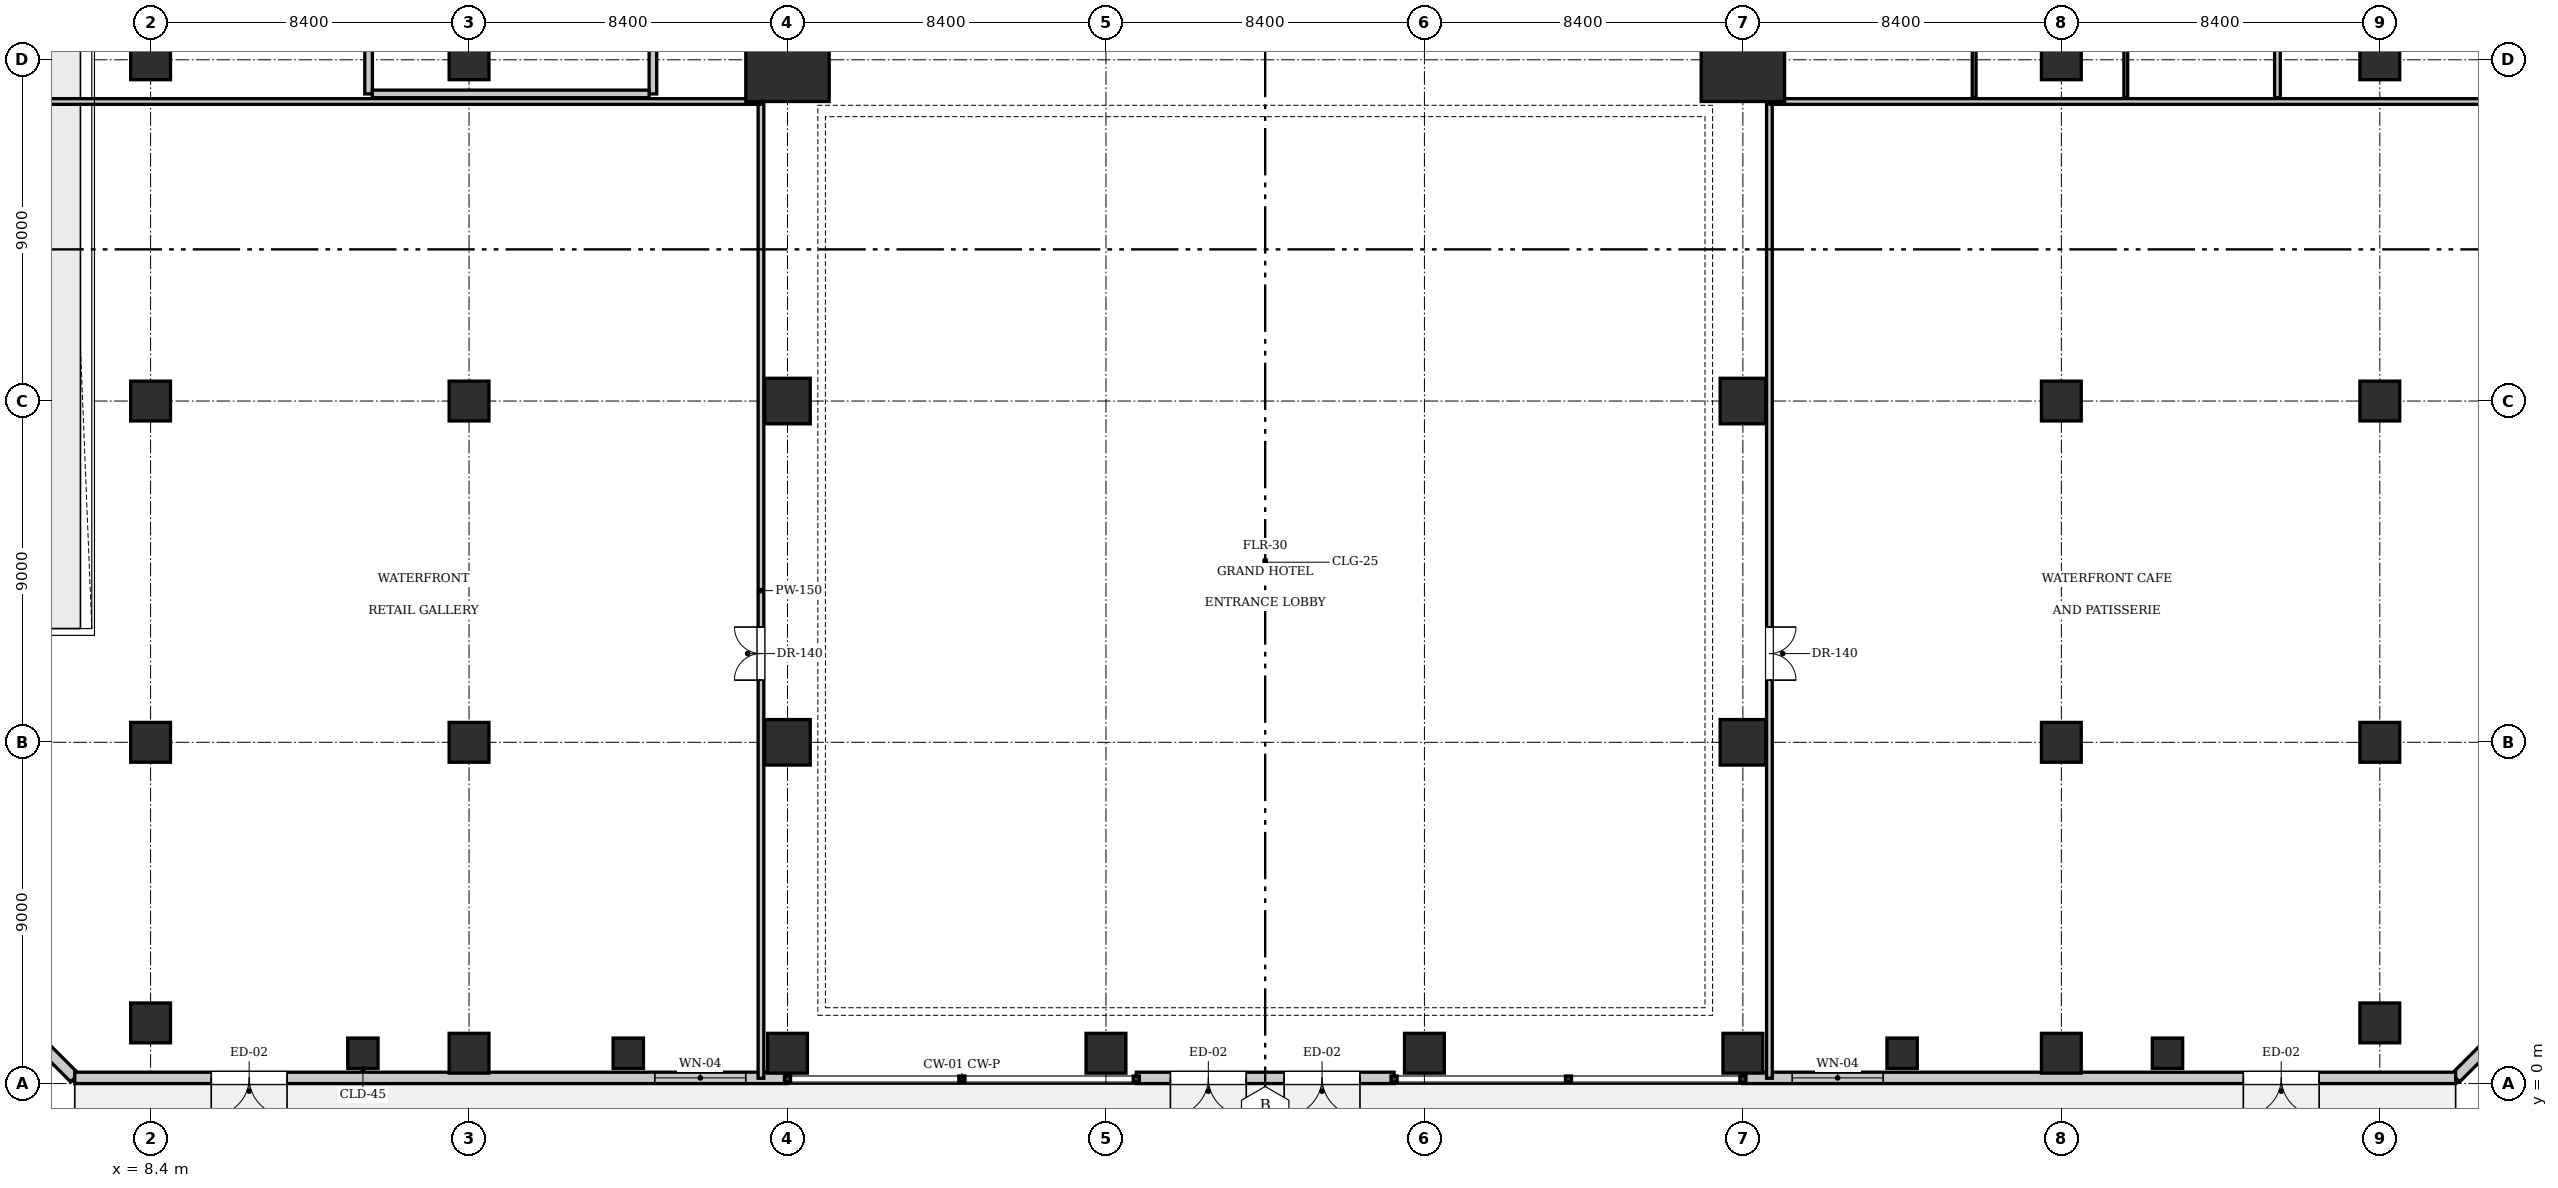
"""IFC4 building model, lengths in metres.
Left out: names, types, materials, properties, quantities, classifications, styles, units other than length and angle.
Written with IfcOpenShell. Run it as: python <this file> out.ifc"""

import sys

from ifc_helpers import new_model, si_unit, direction, frame, frame_2d, origin, origin_2d, place, context, subcontext, project, spatial, rectangle, extrude, element, fill, save


model = new_model("IFC4")
c1 = context("Model", 3, precision=1e-05, world=origin(), true_north=direction((0.0, 1.0)))
c2 = subcontext(c1, "Body", "Model", "MODEL_VIEW")
j1 = project(units=[si_unit("LENGTHUNIT", "METRE"), si_unit("PLANEANGLEUNIT", "RADIAN")], contexts=[c1])
p1 = place(None, origin())
s1 = spatial("IfcSite", under=j1, at=p1, CompositionType="ELEMENT")
p2 = place(p1, origin())
s2 = spatial("IfcBuilding", under=s1, at=p2, CompositionType="ELEMENT")
p3 = place(p2, origin())
s3 = spatial("IfcBuildingStorey", under=s2, at=p3, CompositionType="ELEMENT", Elevation=0.0)
for number, where, z_axis, x_axis in (
    (1, (25.2, 27.0, 0.0), (0.0, 0.0, 1.0), (1.0, 0.0, 0.0)),
    (2, (50.4, 27.0, 0.0), (0.0, 0.0, 1.0), (1.0, 0.0, 0.0)),
):
    element("IfcColumn", number, at=place(p3, frame(where, z_axis=z_axis, x_axis=x_axis)), inside=s3, PredefinedType="COLUMN", context=c2, shape_type="SweptSolid", body=[
        extrude(rectangle(XDim=2.2, YDim=2.2, at=origin_2d()), origin(), (0.0, 0.0, 1.0), 5.6),
    ])
for number, where, z_axis, x_axis in (
    (3, (25.2, 18.0, 0.0), (0.0, 0.0, 1.0), (1.0, 0.0, 0.0)),
    (4, (50.4, 18.0, 0.0), (0.0, 0.0, 1.0), (1.0, 0.0, 0.0)),
    (5, (25.2, 9.0, 0.0), (0.0, 0.0, 1.0), (1.0, 0.0, 0.0)),
    (6, (50.4, 9.0, 0.0), (0.0, 0.0, 1.0), (1.0, 0.0, 0.0)),
):
    element("IfcColumn", number, at=place(p3, frame(where, z_axis=z_axis, x_axis=x_axis)), inside=s3, PredefinedType="COLUMN", context=c2, shape_type="SweptSolid", body=[
        extrude(rectangle(XDim=1.2, YDim=1.2, at=origin_2d()), origin(), (0.0, 0.0, 1.0), 5.6),
    ])
for number, where, z_axis, x_axis in (
    (7, (16.8, 9.0, 0.0), (0.0, 0.0, 1.0), (1.0, 0.0, 0.0)),
    (8, (58.8, 9.0, 0.0), (0.0, 0.0, 1.0), (1.0, 0.0, 0.0)),
    (9, (16.8, 18.0, 0.0), (0.0, 0.0, 1.0), (1.0, 0.0, 0.0)),
    (10, (58.8, 18.0, 0.0), (0.0, 0.0, 1.0), (1.0, 0.0, 0.0)),
    (11, (16.8, 27.0, 0.0), (0.0, 0.0, 1.0), (1.0, 0.0, 0.0)),
    (12, (58.8, 27.0, 0.0), (0.0, 0.0, 1.0), (1.0, 0.0, 0.0)),
    (13, (8.4, 1.6, 0.0), (0.0, 0.0, 1.0), (1.0, 0.0, 0.0)),
    (14, (67.2, 1.6, 0.0), (0.0, 0.0, 1.0), (1.0, 0.0, 0.0)),
    (15, (8.4, 9.0, 0.0), (0.0, 0.0, 1.0), (1.0, 0.0, 0.0)),
    (16, (67.2, 9.0, 0.0), (0.0, 0.0, 1.0), (1.0, 0.0, 0.0)),
    (17, (8.4, 18.0, 0.0), (0.0, 0.0, 1.0), (1.0, 0.0, 0.0)),
    (18, (67.2, 18.0, 0.0), (0.0, 0.0, 1.0), (1.0, 0.0, 0.0)),
    (19, (8.4, 27.0, 0.0), (0.0, 0.0, 1.0), (1.0, 0.0, 0.0)),
    (20, (67.2, 27.0, 0.0), (0.0, 0.0, 1.0), (1.0, 0.0, 0.0)),
    (21, (16.8, 0.8, 0.0), (0.0, 0.0, 1.0), (1.0, 0.0, 0.0)),
    (22, (25.2, 0.8, 0.0), (0.0, 0.0, 1.0), (1.0, 0.0, 0.0)),
    (23, (33.6, 0.8, 0.0), (0.0, 0.0, 1.0), (1.0, 0.0, 0.0)),
    (24, (42.0, 0.8, 0.0), (0.0, 0.0, 1.0), (1.0, 0.0, 0.0)),
    (25, (50.4, 0.8, 0.0), (0.0, 0.0, 1.0), (1.0, 0.0, 0.0)),
    (26, (58.8, 0.8, 0.0), (0.0, 0.0, 1.0), (1.0, 0.0, 0.0)),
):
    element("IfcColumn", number, at=place(p3, frame(where, z_axis=z_axis, x_axis=x_axis)), inside=s3, PredefinedType="COLUMN", context=c2, shape_type="SweptSolid", body=[
        extrude(rectangle(XDim=1.05, YDim=1.05, at=origin_2d()), origin(), (0.0, 0.0, 1.0), 5.6),
    ])
for number, where, z_axis, x_axis in (
    (27, (14.0, 0.8, 0.0), (0.0, 0.0, 1.0), (1.0, 0.0, 0.0)),
    (28, (21.0, 0.8, 0.0), (0.0, 0.0, 1.0), (1.0, 0.0, 0.0)),
    (29, (54.6, 0.8, 0.0), (0.0, 0.0, 1.0), (1.0, 0.0, 0.0)),
    (30, (61.6, 0.8, 0.0), (0.0, 0.0, 1.0), (1.0, 0.0, 0.0)),
):
    element("IfcColumn", number, at=place(p3, frame(where, z_axis=z_axis, x_axis=x_axis)), inside=s3, PredefinedType="PILASTER", context=c2, shape_type="SweptSolid", body=[
        extrude(rectangle(XDim=0.8, YDim=0.8, at=origin_2d()), origin(), (0.0, 0.0, 1.0), 5.6),
    ])
p4 = place(p3, frame((0.15, 6.4, 0.0), z_axis=(0.0, 0.0, 1.0), x_axis=(0.707106781187, -0.707106781187, 0.0)))
e31 = element("IfcWall", 31, at=p4, inside=s3, PredefinedType="SOLIDWALL", context=c2, shape_type="SweptSolid", body=[
    extrude(rectangle(XDim=8.839, YDim=0.3, at=frame_2d((4.419, 0.0))), origin(), (0.0, 0.0, 1.0), 5.32),
])
p5 = place(p4, frame((3.2, 0.0, 0.9)))
e32 = element("IfcOpeningElement", 32, at=p5, cuts=e31, PredefinedType="OPENING", context=c2, shape_type="SweptSolid", body=[
    extrude(rectangle(XDim=2.4, YDim=2.6, at=frame_2d((1.2, 1.3))), frame((0.0, 0.16, 0.0), z_axis=(0.0, -1.0, 0.0), x_axis=(1.0, 0.0, 0.0)), (0.0, 0.0, 1.0), 0.32),
])
p6 = place(p3, frame((69.2, 0.15, 0.0), z_axis=(0.0, 0.0, 1.0), x_axis=(0.707106781187, 0.707106781187, 0.0)))
e33 = element("IfcWall", 33, at=p6, inside=s3, PredefinedType="SOLIDWALL", context=c2, shape_type="SweptSolid", body=[
    extrude(rectangle(XDim=8.839, YDim=0.3, at=frame_2d((4.419, 0.0))), origin(), (0.0, 0.0, 1.0), 5.32),
])
p7 = place(p6, frame((3.2, 0.0, 0.9)))
e34 = element("IfcOpeningElement", 34, at=p7, cuts=e33, PredefinedType="OPENING", context=c2, shape_type="SweptSolid", body=[
    extrude(rectangle(XDim=2.4, YDim=2.6, at=frame_2d((1.2, 1.3))), frame((0.0, 0.16, 0.0), z_axis=(0.0, -1.0, 0.0), x_axis=(1.0, 0.0, 0.0)), (0.0, 0.0, 1.0), 0.32),
])
p8 = place(p3, frame((25.2, 0.15, 0.0), z_axis=(0.0, 0.0, 1.0), x_axis=(-1.0, 0.0, 0.0)))
e35 = element("IfcWall", 35, at=p8, inside=s3, PredefinedType="SOLIDWALL", context=c2, shape_type="SweptSolid", body=[
    extrude(rectangle(XDim=18.8, YDim=0.3, at=frame_2d((9.4, 0.0))), origin(), (0.0, 0.0, 1.0), 5.32),
])
p9 = place(p8, frame((13.2, 0.0, 0.0)))
e36 = element("IfcOpeningElement", 36, at=p9, cuts=e35, PredefinedType="OPENING", context=c2, shape_type="SweptSolid", body=[
    extrude(rectangle(XDim=2.0, YDim=2.4, at=frame_2d((1.0, 1.2))), frame((0.0, 0.16, 0.0), z_axis=(0.0, -1.0, 0.0), x_axis=(1.0, 0.0, 0.0)), (0.0, 0.0, 1.0), 0.32),
])
p10 = place(p8, frame((1.1, 0.0, 0.9)))
e37 = element("IfcOpeningElement", 37, at=p10, cuts=e35, PredefinedType="OPENING", context=c2, shape_type="SweptSolid", body=[
    extrude(rectangle(XDim=2.4, YDim=2.6, at=frame_2d((1.2, 1.3))), frame((0.0, 0.16, 0.0), z_axis=(0.0, -1.0, 0.0), x_axis=(1.0, 0.0, 0.0)), (0.0, 0.0, 1.0), 0.32),
])
p11 = place(p3, frame((69.2, 0.15, 0.0), z_axis=(0.0, 0.0, 1.0), x_axis=(-1.0, 0.0, 0.0)))
e38 = element("IfcWall", 38, at=p11, inside=s3, PredefinedType="SOLIDWALL", context=c2, shape_type="SweptSolid", body=[
    extrude(rectangle(XDim=18.8, YDim=0.3, at=frame_2d((9.4, 0.0))), origin(), (0.0, 0.0, 1.0), 5.32),
])
p12 = place(p11, frame((3.6, 0.0, 0.0)))
e39 = element("IfcOpeningElement", 39, at=p12, cuts=e38, PredefinedType="OPENING", context=c2, shape_type="SweptSolid", body=[
    extrude(rectangle(XDim=2.0, YDim=2.4, at=frame_2d((1.0, 1.2))), frame((0.0, 0.16, 0.0), z_axis=(0.0, -1.0, 0.0), x_axis=(1.0, 0.0, 0.0)), (0.0, 0.0, 1.0), 0.32),
])
p13 = place(p11, frame((15.1, 0.0, 0.9)))
e40 = element("IfcOpeningElement", 40, at=p13, cuts=e38, PredefinedType="OPENING", context=c2, shape_type="SweptSolid", body=[
    extrude(rectangle(XDim=2.4, YDim=2.6, at=frame_2d((1.2, 1.3))), frame((0.0, 0.16, 0.0), z_axis=(0.0, -1.0, 0.0), x_axis=(1.0, 0.0, 0.0)), (0.0, 0.0, 1.0), 0.32),
])
p14 = place(p3, frame((41.2, 0.15, 0.0), z_axis=(0.0, 0.0, 1.0), x_axis=(-1.0, 0.0, 0.0)))
e41 = element("IfcWall", 41, at=p14, inside=s3, PredefinedType="SOLIDWALL", context=c2, shape_type="SweptSolid", body=[
    extrude(rectangle(XDim=6.8, YDim=0.3, at=frame_2d((3.4, 0.0))), origin(), (0.0, 0.0, 1.0), 5.32),
])
p15 = place(p14, frame((0.9, 0.0, 0.0)))
e42 = element("IfcOpeningElement", 42, at=p15, cuts=e41, PredefinedType="OPENING", context=c2, shape_type="SweptSolid", body=[
    extrude(rectangle(XDim=2.0, YDim=2.4, at=frame_2d((1.0, 1.2))), frame((0.0, 0.16, 0.0), z_axis=(0.0, -1.0, 0.0), x_axis=(1.0, 0.0, 0.0)), (0.0, 0.0, 1.0), 0.32),
])
p16 = place(p14, frame((3.9, 0.0, 0.0)))
e43 = element("IfcOpeningElement", 43, at=p16, cuts=e41, PredefinedType="OPENING", context=c2, shape_type="SweptSolid", body=[
    extrude(rectangle(XDim=2.0, YDim=2.4, at=frame_2d((1.0, 1.2))), frame((0.0, 0.16, 0.0), z_axis=(0.0, -1.0, 0.0), x_axis=(1.0, 0.0, 0.0)), (0.0, 0.0, 1.0), 0.32),
])
for number, where, z_axis, x_axis in (
    (44, (14.15, 26.1, 0.0), (0.0, 0.0, 1.0), (0.0, 1.0, 0.0)),
    (45, (21.65, 26.1, 0.0), (0.0, 0.0, 1.0), (0.0, 1.0, 0.0)),
):
    element("IfcWall", number, at=place(p3, frame(where, z_axis=z_axis, x_axis=x_axis)), inside=s3, PredefinedType="PARTITIONING", context=c2, shape_type="SweptSolid", body=[
        extrude(rectangle(XDim=6.1, YDim=0.2, at=frame_2d((3.05, 0.0))), origin(), (0.0, 0.0, 1.0), 5.32),
    ])
p17 = place(p3, frame((14.25, 26.1, 0.0), z_axis=(0.0, 0.0, 1.0), x_axis=(1.0, 0.0, 0.0)))
e46 = element("IfcWall", 46, at=p17, inside=s3, PredefinedType="PARTITIONING", context=c2, shape_type="SweptSolid", body=[
    extrude(rectangle(XDim=7.3, YDim=0.2, at=frame_2d((3.65, 0.0))), origin(), (0.0, 0.0, 1.0), 5.32),
])
p18 = place(p3, frame((24.5, 0.14, 0.0), z_axis=(0.0, 0.0, 1.0), x_axis=(0.0, 1.0, 0.0)))
e47 = element("IfcWall", 47, at=p18, inside=s3, PredefinedType="PARTITIONING", context=c2, shape_type="SweptSolid", body=[
    extrude(rectangle(XDim=25.72, YDim=0.15, at=frame_2d((12.86, 0.0))), origin(), (0.0, 0.0, 1.0), 5.32),
])
p19 = place(p18, frame((10.5, 0.0, 0.0)))
e48 = element("IfcOpeningElement", 48, at=p19, cuts=e47, PredefinedType="OPENING", context=c2, shape_type="SweptSolid", body=[
    extrude(rectangle(XDim=1.4, YDim=2.2, at=frame_2d((0.7, 1.1))), frame((0.0, 0.085, 0.0), z_axis=(0.0, -1.0, 0.0), x_axis=(1.0, 0.0, 0.0)), (0.0, 0.0, 1.0), 0.17),
])
p20 = place(p3, frame((0.14, 25.9, 0.0), z_axis=(0.0, 0.0, 1.0), x_axis=(1.0, 0.0, 0.0)))
e49 = element("IfcWall", 49, at=p20, inside=s3, PredefinedType="PARTITIONING", context=c2, shape_type="SweptSolid", body=[
    extrude(rectangle(XDim=24.34, YDim=0.15, at=frame_2d((12.17, 0.0))), origin(), (0.0, 0.0, 1.0), 5.32),
])
p21 = place(p3, frame((51.1, 0.14, 0.0), z_axis=(0.0, 0.0, 1.0), x_axis=(0.0, 1.0, 0.0)))
e50 = element("IfcWall", 50, at=p21, inside=s3, PredefinedType="PARTITIONING", context=c2, shape_type="SweptSolid", body=[
    extrude(rectangle(XDim=25.72, YDim=0.15, at=frame_2d((12.86, 0.0))), origin(), (0.0, 0.0, 1.0), 5.32),
])
p22 = place(p21, frame((10.5, 0.0, 0.0)))
e51 = element("IfcOpeningElement", 51, at=p22, cuts=e50, PredefinedType="OPENING", context=c2, shape_type="SweptSolid", body=[
    extrude(rectangle(XDim=1.4, YDim=2.2, at=frame_2d((0.7, 1.1))), frame((0.0, 0.085, 0.0), z_axis=(0.0, -1.0, 0.0), x_axis=(1.0, 0.0, 0.0)), (0.0, 0.0, 1.0), 0.17),
])
p23 = place(p3, frame((51.12, 25.9, 0.0), z_axis=(0.0, 0.0, 1.0), x_axis=(1.0, 0.0, 0.0)))
e52 = element("IfcWall", 52, at=p23, inside=s3, PredefinedType="PARTITIONING", context=c2, shape_type="SweptSolid", body=[
    extrude(rectangle(XDim=24.34, YDim=0.15, at=frame_2d((12.17, 0.0))), origin(), (0.0, 0.0, 1.0), 5.32),
])
for number, where, z_axis, x_axis in (
    (53, (56.5, 26.0, 0.0), (0.0, 0.0, 1.0), (0.0, 1.0, 0.0)),
    (54, (60.5, 26.0, 0.0), (0.0, 0.0, 1.0), (0.0, 1.0, 0.0)),
):
    element("IfcWall", number, at=place(p3, frame(where, z_axis=z_axis, x_axis=x_axis)), inside=s3, PredefinedType="PARTITIONING", context=c2, shape_type="SweptSolid", body=[
        extrude(rectangle(XDim=6.22, YDim=0.1, at=frame_2d((3.11, 0.0))), origin(), (0.0, 0.0, 1.0), 5.32),
    ])
p24 = place(p3, frame((64.5, 26.0, 0.0), z_axis=(0.0, 0.0, 1.0), x_axis=(0.0, 1.0, 0.0)))
e55 = element("IfcWall", 55, at=p24, inside=s3, PredefinedType="PARTITIONING", context=c2, shape_type="SweptSolid", body=[
    extrude(rectangle(XDim=6.28, YDim=0.15, at=frame_2d((3.14, 0.0))), origin(), (0.0, 0.0, 1.0), 5.32),
])
p25 = place(p9, origin())
e56 = element("IfcDoor", 56, at=p25, inside=s3, OperationType="DOUBLE_DOOR_SINGLE_SWING", PredefinedType="DOOR", context=c2, shape_type="SweptSolid", body=[
    extrude(rectangle(XDim=2.0, YDim=2.4, at=frame_2d((1.0, 1.2))), frame((0.0, 0.025, 0.0), z_axis=(0.0, -1.0, 0.0), x_axis=(1.0, 0.0, 0.0)), (0.0, 0.0, 1.0), 0.05),
])
fill(e36, e56)
p26 = place(p10, origin())
e57 = element("IfcWindow", 57, at=p26, inside=s3, PartitioningType="SINGLE_PANEL", PredefinedType="WINDOW", context=c2, shape_type="SweptSolid", body=[
    extrude(rectangle(XDim=2.4, YDim=2.6, at=frame_2d((1.2, 1.3))), frame((0.0, 0.03, 0.0), z_axis=(0.0, -1.0, 0.0), x_axis=(1.0, 0.0, 0.0)), (0.0, 0.0, 1.0), 0.06),
])
fill(e37, e57)
p27 = place(p12, origin())
e58 = element("IfcDoor", 58, at=p27, inside=s3, OperationType="DOUBLE_DOOR_SINGLE_SWING", PredefinedType="DOOR", context=c2, shape_type="SweptSolid", body=[
    extrude(rectangle(XDim=2.0, YDim=2.4, at=frame_2d((1.0, 1.2))), frame((0.0, 0.025, 0.0), z_axis=(0.0, -1.0, 0.0), x_axis=(1.0, 0.0, 0.0)), (0.0, 0.0, 1.0), 0.05),
])
fill(e39, e58)
p28 = place(p13, origin())
e59 = element("IfcWindow", 59, at=p28, inside=s3, PartitioningType="SINGLE_PANEL", PredefinedType="WINDOW", context=c2, shape_type="SweptSolid", body=[
    extrude(rectangle(XDim=2.4, YDim=2.6, at=frame_2d((1.2, 1.3))), frame((0.0, 0.03, 0.0), z_axis=(0.0, -1.0, 0.0), x_axis=(1.0, 0.0, 0.0)), (0.0, 0.0, 1.0), 0.06),
])
fill(e40, e59)
p29 = place(p15, origin())
e60 = element("IfcDoor", 60, at=p29, inside=s3, OperationType="DOUBLE_DOOR_SINGLE_SWING", PredefinedType="DOOR", context=c2, shape_type="SweptSolid", body=[
    extrude(rectangle(XDim=2.0, YDim=2.4, at=frame_2d((1.0, 1.2))), frame((0.0, 0.025, 0.0), z_axis=(0.0, -1.0, 0.0), x_axis=(1.0, 0.0, 0.0)), (0.0, 0.0, 1.0), 0.05),
])
fill(e42, e60)
p30 = place(p16, origin())
e61 = element("IfcDoor", 61, at=p30, inside=s3, OperationType="DOUBLE_DOOR_SINGLE_SWING", PredefinedType="DOOR", context=c2, shape_type="SweptSolid", body=[
    extrude(rectangle(XDim=2.0, YDim=2.4, at=frame_2d((1.0, 1.2))), frame((0.0, 0.025, 0.0), z_axis=(0.0, -1.0, 0.0), x_axis=(1.0, 0.0, 0.0)), (0.0, 0.0, 1.0), 0.05),
])
fill(e43, e61)
p31 = place(p19, origin())
e62 = element("IfcDoor", 62, at=p31, inside=s3, OperationType="DOUBLE_DOOR_SINGLE_SWING", PredefinedType="DOOR", context=c2, shape_type="SweptSolid", body=[
    extrude(rectangle(XDim=1.4, YDim=2.2, at=frame_2d((0.7, 1.1))), frame((0.0, 0.025, 0.0), z_axis=(0.0, -1.0, 0.0), x_axis=(1.0, 0.0, 0.0)), (0.0, 0.0, 1.0), 0.05),
])
fill(e48, e62)
p32 = place(p22, frame((1.4, 0.0, 0.0), z_axis=(0.0, 0.0, 1.0), x_axis=(-1.0, 0.0, 0.0)))
e63 = element("IfcDoor", 63, at=p32, inside=s3, OperationType="DOUBLE_DOOR_SINGLE_SWING", PredefinedType="DOOR", context=c2, shape_type="SweptSolid", body=[
    extrude(rectangle(XDim=1.4, YDim=2.2, at=frame_2d((0.7, 1.1))), frame((0.0, 0.025, 0.0), z_axis=(0.0, -1.0, 0.0), x_axis=(1.0, 0.0, 0.0)), (0.0, 0.0, 1.0), 0.05),
])
fill(e51, e63)
save(model, sys.argv[1])
